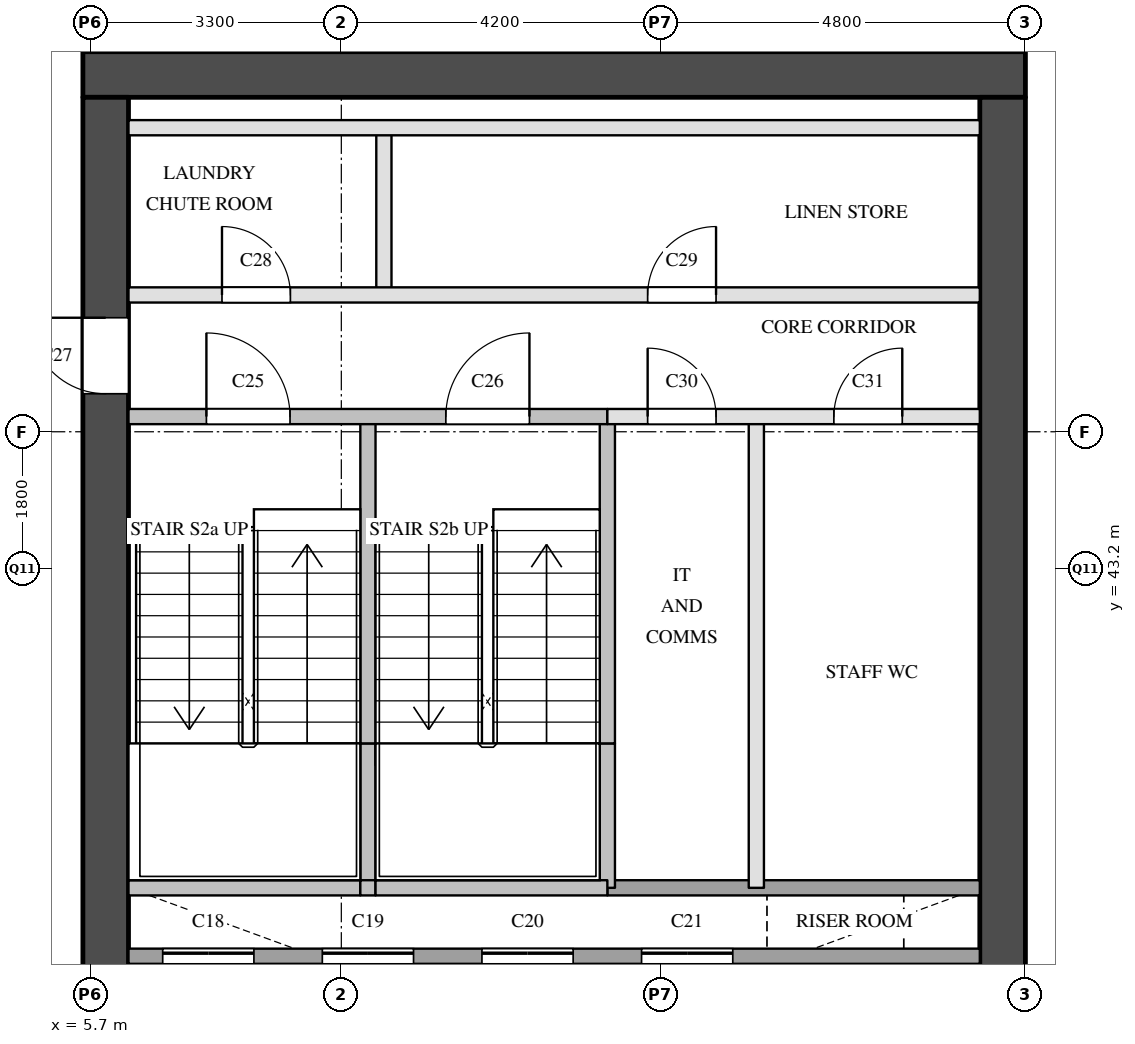
"""IFC4 building model, lengths in metres.
Left out: names, types, materials, properties, quantities, classifications, styles, units other than length and angle.
Written with IfcOpenShell. Run it as: python <this file> out.ifc"""

import sys

from ifc_helpers import new_model, si_unit, direction, frame, frame_2d, origin, place, context, subcontext, project, spatial, rectangle, extrude, element, fill, save


model = new_model("IFC4")
c1 = context("Model", 3, precision=1e-05, world=origin(), true_north=direction((0.0, 1.0)))
c2 = subcontext(c1, "Body", "Model", "MODEL_VIEW")
j1 = project(units=[si_unit("LENGTHUNIT", "METRE"), si_unit("PLANEANGLEUNIT", "RADIAN")], contexts=[c1])
p1 = place(None, origin())
s1 = spatial("IfcSite", under=j1, at=p1, CompositionType="ELEMENT")
p2 = place(p1, origin())
s2 = spatial("IfcBuilding", under=s1, at=p2, CompositionType="ELEMENT")
p3 = place(p2, frame((0.0, 0.0, 65.2)))
s3 = spatial("IfcBuildingStorey", under=s2, at=p3, CompositionType="ELEMENT", Elevation=65.2)
p4 = place(p3, frame((5.6, 49.7, 0.0), z_axis=(0.0, 0.0, 1.0), x_axis=(1.0, 0.0, 0.0)))
e1 = element("IfcWall", 1, at=p4, inside=s3, PredefinedType="SHEAR", context=c2, shape_type="SweptSolid", body=[
    extrude(rectangle(XDim=12.4, YDim=0.6, at=frame_2d((6.2, 0.0))), origin(), (0.0, 0.0, 1.0), 3.5),
])
p5 = place(p3, frame((5.9, 29.1, 0.0), z_axis=(0.0, 0.0, 1.0), x_axis=(0.0, 1.0, 0.0)))
e2 = element("IfcWall", 2, at=p5, inside=s3, PredefinedType="SHEAR", context=c2, shape_type="SweptSolid", body=[
    extrude(rectangle(XDim=20.3, YDim=0.6, at=frame_2d((10.15, 0.0))), origin(), (0.0, 0.0, 1.0), 3.5),
])
p6 = place(p5, frame((3.6, 0.0, 0.0)))
e3 = element("IfcOpeningElement", 3, at=p6, cuts=e2, PredefinedType="OPENING", context=c2, shape_type="SweptSolid", body=[
    extrude(rectangle(XDim=1.8, YDim=2.1, at=frame_2d((0.9, 1.05))), frame((0.0, 0.31, 0.0), z_axis=(0.0, -1.0, 0.0), x_axis=(1.0, 0.0, 0.0)), (0.0, 0.0, 1.0), 0.62),
])
p7 = place(p5, frame((16.4, 0.0, 0.0)))
e4 = element("IfcOpeningElement", 4, at=p7, cuts=e2, PredefinedType="OPENING", context=c2, shape_type="SweptSolid", body=[
    extrude(rectangle(XDim=1.0, YDim=2.1, at=frame_2d((0.5, 1.05))), frame((0.0, 0.31, 0.0), z_axis=(0.0, -1.0, 0.0), x_axis=(1.0, 0.0, 0.0)), (0.0, 0.0, 1.0), 0.62),
])
p8 = place(p3, frame((17.7, 29.1, 0.0), z_axis=(0.0, 0.0, 1.0), x_axis=(0.0, 1.0, 0.0)))
e5 = element("IfcWall", 5, at=p8, inside=s3, PredefinedType="SHEAR", context=c2, shape_type="SweptSolid", body=[
    extrude(rectangle(XDim=20.3, YDim=0.6, at=frame_2d((10.15, 0.0))), origin(), (0.0, 0.0, 1.0), 3.5),
])
p9 = place(p8, frame((1.25, 0.0, 0.0)))
e6 = element("IfcOpeningElement", 6, at=p9, cuts=e5, PredefinedType="OPENING", context=c2, shape_type="SweptSolid", body=[
    extrude(rectangle(XDim=0.7, YDim=2.1, at=frame_2d((0.35, 1.05))), frame((0.0, 0.31, 0.0), z_axis=(0.0, -1.0, 0.0), x_axis=(1.0, 0.0, 0.0)), (0.0, 0.0, 1.0), 0.62),
])
p10 = place(p8, frame((7.05, 0.0, 0.0)))
e7 = element("IfcOpeningElement", 7, at=p10, cuts=e5, PredefinedType="OPENING", context=c2, shape_type="SweptSolid", body=[
    extrude(rectangle(XDim=0.7, YDim=2.1, at=frame_2d((0.35, 1.05))), frame((0.0, 0.31, 0.0), z_axis=(0.0, -1.0, 0.0), x_axis=(1.0, 0.0, 0.0)), (0.0, 0.0, 1.0), 0.62),
])
p11 = place(p3, frame((8.3, 34.9, 0.0), z_axis=(0.0, 0.0, 1.0), x_axis=(0.0, 1.0, 0.0)))
e8 = element("IfcWall", 8, at=p11, inside=s3, PredefinedType="SOLIDWALL", context=c2, shape_type="SweptSolid", body=[
    extrude(rectangle(XDim=3.2, YDim=0.2, at=frame_2d((1.6, 0.0))), origin(), (0.0, 0.0, 1.0), 3.5),
])
p12 = place(p3, frame((9.35, 39.0, 0.0), z_axis=(0.0, 0.0, 1.0), x_axis=(0.0, 1.0, 0.0)))
e9 = element("IfcWall", 9, at=p12, inside=s3, PredefinedType="SOLIDWALL", context=c2, shape_type="SweptSolid", body=[
    extrude(rectangle(XDim=1.9, YDim=0.2, at=frame_2d((0.95, 0.0))), origin(), (0.0, 0.0, 1.0), 3.5),
])
p13 = place(p3, frame((9.35, 40.9, 0.0), z_axis=(0.0, 0.0, 1.0), x_axis=(0.0, 1.0, 0.0)))
e10 = element("IfcWall", 10, at=p13, inside=s3, PredefinedType="SOLIDWALL", context=c2, shape_type="SweptSolid", body=[
    extrude(rectangle(XDim=4.3, YDim=0.2, at=frame_2d((2.15, 0.0))), origin(), (0.0, 0.0, 1.0), 3.5),
])
p14 = place(p3, frame((9.56, 46.8, 0.0), z_axis=(0.0, 0.0, 1.0), x_axis=(0.0, 1.0, 0.0)))
e11 = element("IfcWall", 11, at=p14, inside=s3, PredefinedType="PARTITIONING", context=c2, shape_type="SweptSolid", body=[
    extrude(rectangle(XDim=2.2, YDim=0.2, at=frame_2d((1.1, 0.0))), origin(), (0.0, 0.0, 1.0), 3.5),
])
for number, where, z_axis, x_axis in (
    (12, (10.4, 34.9, 0.0), (0.0, 0.0, 1.0), (0.0, 1.0, 0.0)),
    (13, (12.5, 34.9, 0.0), (0.0, 0.0, 1.0), (0.0, 1.0, 0.0)),
):
    element("IfcWall", number, at=place(p3, frame(where, z_axis=z_axis, x_axis=x_axis)), inside=s3, PredefinedType="SOLIDWALL", context=c2, shape_type="SweptSolid", body=[
        extrude(rectangle(XDim=3.2, YDim=0.2, at=frame_2d((1.6, 0.0))), origin(), (0.0, 0.0, 1.0), 3.5),
    ])
p15 = place(p3, frame((12.5, 39.0, 0.0), z_axis=(0.0, 0.0, 1.0), x_axis=(0.0, 1.0, 0.0)))
e14 = element("IfcWall", 14, at=p15, inside=s3, PredefinedType="SOLIDWALL", context=c2, shape_type="SweptSolid", body=[
    extrude(rectangle(XDim=1.9, YDim=0.2, at=frame_2d((0.95, 0.0))), origin(), (0.0, 0.0, 1.0), 3.5),
])
p16 = place(p3, frame((12.5, 40.9, 0.0), z_axis=(0.0, 0.0, 1.0), x_axis=(0.0, 1.0, 0.0)))
e15 = element("IfcWall", 15, at=p16, inside=s3, PredefinedType="SOLIDWALL", context=c2, shape_type="SweptSolid", body=[
    extrude(rectangle(XDim=4.3, YDim=0.2, at=frame_2d((2.15, 0.0))), origin(), (0.0, 0.0, 1.0), 3.5),
])
p17 = place(p3, frame((14.46, 39.0, 0.0), z_axis=(0.0, 0.0, 1.0), x_axis=(0.0, 1.0, 0.0)))
e16 = element("IfcWall", 16, at=p17, inside=s3, PredefinedType="PARTITIONING", context=c2, shape_type="SweptSolid", body=[
    extrude(rectangle(XDim=6.2, YDim=0.2, at=frame_2d((3.1, 0.0))), origin(), (0.0, 0.0, 1.0), 3.5),
])
for number, where, z_axis, x_axis in (
    (17, (14.6, 34.9, 0.0), (0.0, 0.0, 1.0), (0.0, 1.0, 0.0)),
    (18, (16.7, 34.9, 0.0), (0.0, 0.0, 1.0), (0.0, 1.0, 0.0)),
):
    element("IfcWall", number, at=place(p3, frame(where, z_axis=z_axis, x_axis=x_axis)), inside=s3, PredefinedType="SOLIDWALL", context=c2, shape_type="SweptSolid", body=[
        extrude(rectangle(XDim=3.2, YDim=0.2, at=frame_2d((1.6, 0.0))), origin(), (0.0, 0.0, 1.0), 3.5),
    ])
p18 = place(p3, frame((6.2, 38.1, 0.0), z_axis=(0.0, 0.0, 1.0), x_axis=(1.0, 0.0, 0.0)))
e19 = element("IfcWall", 19, at=p18, inside=s3, PredefinedType="SOLIDWALL", context=c2, shape_type="SweptSolid", body=[
    extrude(rectangle(XDim=11.2, YDim=0.2, at=frame_2d((5.6, 0.0))), origin(), (0.0, 0.0, 1.0), 3.5),
])
p19 = place(p18, frame((0.45, 0.0, 0.0)))
e20 = element("IfcOpeningElement", 20, at=p19, cuts=e19, PredefinedType="OPENING", context=c2, shape_type="SweptSolid", body=[
    extrude(rectangle(XDim=1.2, YDim=2.1, at=frame_2d((0.6, 1.05))), frame((0.0, 0.11, 0.0), z_axis=(0.0, -1.0, 0.0), x_axis=(1.0, 0.0, 0.0)), (0.0, 0.0, 1.0), 0.22),
])
p20 = place(p18, frame((2.55, 0.0, 0.0)))
e21 = element("IfcOpeningElement", 21, at=p20, cuts=e19, PredefinedType="OPENING", context=c2, shape_type="SweptSolid", body=[
    extrude(rectangle(XDim=1.2, YDim=2.1, at=frame_2d((0.6, 1.05))), frame((0.0, 0.11, 0.0), z_axis=(0.0, -1.0, 0.0), x_axis=(1.0, 0.0, 0.0)), (0.0, 0.0, 1.0), 0.22),
])
p21 = place(p18, frame((4.65, 0.0, 0.0)))
e22 = element("IfcOpeningElement", 22, at=p21, cuts=e19, PredefinedType="OPENING", context=c2, shape_type="SweptSolid", body=[
    extrude(rectangle(XDim=1.2, YDim=2.1, at=frame_2d((0.6, 1.05))), frame((0.0, 0.11, 0.0), z_axis=(0.0, -1.0, 0.0), x_axis=(1.0, 0.0, 0.0)), (0.0, 0.0, 1.0), 0.22),
])
p22 = place(p18, frame((6.75, 0.0, 0.0)))
e23 = element("IfcOpeningElement", 23, at=p22, cuts=e19, PredefinedType="OPENING", context=c2, shape_type="SweptSolid", body=[
    extrude(rectangle(XDim=1.2, YDim=2.1, at=frame_2d((0.6, 1.05))), frame((0.0, 0.11, 0.0), z_axis=(0.0, -1.0, 0.0), x_axis=(1.0, 0.0, 0.0)), (0.0, 0.0, 1.0), 0.22),
])
p23 = place(p3, frame((12.5, 39.0, 0.0), z_axis=(0.0, 0.0, 1.0), x_axis=(1.0, 0.0, 0.0)))
e24 = element("IfcWall", 24, at=p23, inside=s3, PredefinedType="SOLIDWALL", context=c2, shape_type="SweptSolid", body=[
    extrude(rectangle(XDim=4.9, YDim=0.2, at=frame_2d((2.45, 0.0))), origin(), (0.0, 0.0, 1.0), 3.5),
])
p24 = place(p3, frame((6.2, 39.0, 0.0), z_axis=(0.0, 0.0, 1.0), x_axis=(1.0, 0.0, 0.0)))
e25 = element("IfcWall", 25, at=p24, inside=s3, PredefinedType="SOLIDWALL", context=c2, shape_type="SweptSolid", body=[
    extrude(rectangle(XDim=3.05, YDim=0.2, at=frame_2d((1.525, 0.0))), origin(), (0.0, 0.0, 1.0), 3.5),
])
p25 = place(p3, frame((9.25, 39.0, 0.0), z_axis=(0.0, 0.0, 1.0), x_axis=(1.0, 0.0, 0.0)))
e26 = element("IfcWall", 26, at=p25, inside=s3, PredefinedType="SOLIDWALL", context=c2, shape_type="SweptSolid", body=[
    extrude(rectangle(XDim=0.2, YDim=0.2, at=frame_2d((0.1, 0.0))), origin(), (0.0, 0.0, 1.0), 3.5),
])
p26 = place(p3, frame((9.45, 39.0, 0.0), z_axis=(0.0, 0.0, 1.0), x_axis=(1.0, 0.0, 0.0)))
e27 = element("IfcWall", 27, at=p26, inside=s3, PredefinedType="SOLIDWALL", context=c2, shape_type="SweptSolid", body=[
    extrude(rectangle(XDim=3.05, YDim=0.2, at=frame_2d((1.525, 0.0))), origin(), (0.0, 0.0, 1.0), 3.5),
])
p27 = place(p3, frame((12.5, 45.2, 0.0), z_axis=(0.0, 0.0, 1.0), x_axis=(1.0, 0.0, 0.0)))
e28 = element("IfcWall", 28, at=p27, inside=s3, PredefinedType="PARTITIONING", context=c2, shape_type="SweptSolid", body=[
    extrude(rectangle(XDim=4.9, YDim=0.2, at=frame_2d((2.45, 0.0))), origin(), (0.0, 0.0, 1.0), 3.5),
])
p28 = place(p27, frame((0.53, 0.0, 0.0)))
e29 = element("IfcOpeningElement", 29, at=p28, cuts=e28, PredefinedType="OPENING", context=c2, shape_type="SweptSolid", body=[
    extrude(rectangle(XDim=0.9, YDim=2.1, at=frame_2d((0.45, 1.05))), frame((0.0, 0.11, 0.0), z_axis=(0.0, -1.0, 0.0), x_axis=(1.0, 0.0, 0.0)), (0.0, 0.0, 1.0), 0.22),
])
p29 = place(p27, frame((2.98, 0.0, 0.0)))
e30 = element("IfcOpeningElement", 30, at=p29, cuts=e28, PredefinedType="OPENING", context=c2, shape_type="SweptSolid", body=[
    extrude(rectangle(XDim=0.9, YDim=2.1, at=frame_2d((0.45, 1.05))), frame((0.0, 0.11, 0.0), z_axis=(0.0, -1.0, 0.0), x_axis=(1.0, 0.0, 0.0)), (0.0, 0.0, 1.0), 0.22),
])
p30 = place(p3, frame((6.2, 45.2, 0.0), z_axis=(0.0, 0.0, 1.0), x_axis=(1.0, 0.0, 0.0)))
e31 = element("IfcWall", 31, at=p30, inside=s3, PredefinedType="SOLIDWALL", context=c2, shape_type="SweptSolid", body=[
    extrude(rectangle(XDim=6.3, YDim=0.2, at=frame_2d((3.15, 0.0))), origin(), (0.0, 0.0, 1.0), 3.5),
])
p31 = place(p30, frame((1.025, 0.0, 0.0)))
e32 = element("IfcOpeningElement", 32, at=p31, cuts=e31, PredefinedType="OPENING", context=c2, shape_type="SweptSolid", body=[
    extrude(rectangle(XDim=1.1, YDim=2.1, at=frame_2d((0.55, 1.05))), frame((0.0, 0.11, 0.0), z_axis=(0.0, -1.0, 0.0), x_axis=(1.0, 0.0, 0.0)), (0.0, 0.0, 1.0), 0.22),
])
p32 = place(p30, frame((4.175, 0.0, 0.0)))
e33 = element("IfcOpeningElement", 33, at=p32, cuts=e31, PredefinedType="OPENING", context=c2, shape_type="SweptSolid", body=[
    extrude(rectangle(XDim=1.1, YDim=2.1, at=frame_2d((0.55, 1.05))), frame((0.0, 0.11, 0.0), z_axis=(0.0, -1.0, 0.0), x_axis=(1.0, 0.0, 0.0)), (0.0, 0.0, 1.0), 0.22),
])
p33 = place(p3, frame((6.2, 46.8, 0.0), z_axis=(0.0, 0.0, 1.0), x_axis=(1.0, 0.0, 0.0)))
e34 = element("IfcWall", 34, at=p33, inside=s3, PredefinedType="PARTITIONING", context=c2, shape_type="SweptSolid", body=[
    extrude(rectangle(XDim=11.2, YDim=0.2, at=frame_2d((5.6, 0.0))), origin(), (0.0, 0.0, 1.0), 3.5),
])
p34 = place(p33, frame((1.23, 0.0, 0.0)))
e35 = element("IfcOpeningElement", 35, at=p34, cuts=e34, PredefinedType="OPENING", context=c2, shape_type="SweptSolid", body=[
    extrude(rectangle(XDim=0.9, YDim=2.1, at=frame_2d((0.45, 1.05))), frame((0.0, 0.11, 0.0), z_axis=(0.0, -1.0, 0.0), x_axis=(1.0, 0.0, 0.0)), (0.0, 0.0, 1.0), 0.22),
])
p35 = place(p33, frame((6.83, 0.0, 0.0)))
e36 = element("IfcOpeningElement", 36, at=p35, cuts=e34, PredefinedType="OPENING", context=c2, shape_type="SweptSolid", body=[
    extrude(rectangle(XDim=0.9, YDim=2.1, at=frame_2d((0.45, 1.05))), frame((0.0, 0.11, 0.0), z_axis=(0.0, -1.0, 0.0), x_axis=(1.0, 0.0, 0.0)), (0.0, 0.0, 1.0), 0.22),
])
p36 = place(p3, frame((6.2, 49.0, 0.0), z_axis=(0.0, 0.0, 1.0), x_axis=(1.0, 0.0, 0.0)))
e37 = element("IfcWall", 37, at=p36, inside=s3, PredefinedType="PARTITIONING", context=c2, shape_type="SweptSolid", body=[
    extrude(rectangle(XDim=11.2, YDim=0.2, at=frame_2d((5.6, 0.0))), origin(), (0.0, 0.0, 1.0), 3.5),
])
p37 = place(p19, origin())
e38 = element("IfcDoor", 38, at=p37, inside=s3, OperationType="SLIDING_TO_LEFT", PredefinedType="DOOR", context=c2, shape_type="SweptSolid", body=[
    extrude(rectangle(XDim=1.2, YDim=2.1, at=frame_2d((0.6, 1.05))), frame((0.0, 0.025, 0.0), z_axis=(0.0, -1.0, 0.0), x_axis=(1.0, 0.0, 0.0)), (0.0, 0.0, 1.0), 0.05),
])
fill(e20, e38)
p38 = place(p20, origin())
e39 = element("IfcDoor", 39, at=p38, inside=s3, OperationType="SLIDING_TO_LEFT", PredefinedType="DOOR", context=c2, shape_type="SweptSolid", body=[
    extrude(rectangle(XDim=1.2, YDim=2.1, at=frame_2d((0.6, 1.05))), frame((0.0, 0.025, 0.0), z_axis=(0.0, -1.0, 0.0), x_axis=(1.0, 0.0, 0.0)), (0.0, 0.0, 1.0), 0.05),
])
fill(e21, e39)
p39 = place(p21, origin())
e40 = element("IfcDoor", 40, at=p39, inside=s3, OperationType="SLIDING_TO_LEFT", PredefinedType="DOOR", context=c2, shape_type="SweptSolid", body=[
    extrude(rectangle(XDim=1.2, YDim=2.1, at=frame_2d((0.6, 1.05))), frame((0.0, 0.025, 0.0), z_axis=(0.0, -1.0, 0.0), x_axis=(1.0, 0.0, 0.0)), (0.0, 0.0, 1.0), 0.05),
])
fill(e22, e40)
p40 = place(p22, origin())
e41 = element("IfcDoor", 41, at=p40, inside=s3, OperationType="SLIDING_TO_LEFT", PredefinedType="DOOR", context=c2, shape_type="SweptSolid", body=[
    extrude(rectangle(XDim=1.2, YDim=2.1, at=frame_2d((0.6, 1.05))), frame((0.0, 0.025, 0.0), z_axis=(0.0, -1.0, 0.0), x_axis=(1.0, 0.0, 0.0)), (0.0, 0.0, 1.0), 0.05),
])
fill(e23, e41)
p41 = place(p31, origin())
e42 = element("IfcDoor", 42, at=p41, inside=s3, OperationType="SINGLE_SWING_LEFT", PredefinedType="DOOR", context=c2, shape_type="SweptSolid", body=[
    extrude(rectangle(XDim=1.1, YDim=2.1, at=frame_2d((0.55, 1.05))), frame((0.0, 0.025, 0.0), z_axis=(0.0, -1.0, 0.0), x_axis=(1.0, 0.0, 0.0)), (0.0, 0.0, 1.0), 0.05),
])
fill(e32, e42)
p42 = place(p32, origin())
e43 = element("IfcDoor", 43, at=p42, inside=s3, OperationType="SINGLE_SWING_RIGHT", PredefinedType="DOOR", context=c2, shape_type="SweptSolid", body=[
    extrude(rectangle(XDim=1.1, YDim=2.1, at=frame_2d((0.55, 1.05))), frame((0.0, 0.025, 0.0), z_axis=(0.0, -1.0, 0.0), x_axis=(1.0, 0.0, 0.0)), (0.0, 0.0, 1.0), 0.05),
])
fill(e33, e43)
p43 = place(p7, origin())
e44 = element("IfcDoor", 44, at=p43, inside=s3, OperationType="SINGLE_SWING_RIGHT", PredefinedType="DOOR", context=c2, shape_type="SweptSolid", body=[
    extrude(rectangle(XDim=1.0, YDim=2.1, at=frame_2d((0.5, 1.05))), frame((0.0, 0.025, 0.0), z_axis=(0.0, -1.0, 0.0), x_axis=(1.0, 0.0, 0.0)), (0.0, 0.0, 1.0), 0.05),
])
fill(e4, e44)
p44 = place(p34, origin())
e45 = element("IfcDoor", 45, at=p44, inside=s3, OperationType="SINGLE_SWING_LEFT", PredefinedType="DOOR", context=c2, shape_type="SweptSolid", body=[
    extrude(rectangle(XDim=0.9, YDim=2.1, at=frame_2d((0.45, 1.05))), frame((0.0, 0.025, 0.0), z_axis=(0.0, -1.0, 0.0), x_axis=(1.0, 0.0, 0.0)), (0.0, 0.0, 1.0), 0.05),
])
fill(e35, e45)
p45 = place(p35, origin())
e46 = element("IfcDoor", 46, at=p45, inside=s3, OperationType="SINGLE_SWING_RIGHT", PredefinedType="DOOR", context=c2, shape_type="SweptSolid", body=[
    extrude(rectangle(XDim=0.9, YDim=2.1, at=frame_2d((0.45, 1.05))), frame((0.0, 0.025, 0.0), z_axis=(0.0, -1.0, 0.0), x_axis=(1.0, 0.0, 0.0)), (0.0, 0.0, 1.0), 0.05),
])
fill(e36, e46)
p46 = place(p28, origin())
e47 = element("IfcDoor", 47, at=p46, inside=s3, OperationType="SINGLE_SWING_LEFT", PredefinedType="DOOR", context=c2, shape_type="SweptSolid", body=[
    extrude(rectangle(XDim=0.9, YDim=2.1, at=frame_2d((0.45, 1.05))), frame((0.0, 0.025, 0.0), z_axis=(0.0, -1.0, 0.0), x_axis=(1.0, 0.0, 0.0)), (0.0, 0.0, 1.0), 0.05),
])
fill(e29, e47)
p47 = place(p29, origin())
e48 = element("IfcDoor", 48, at=p47, inside=s3, OperationType="SINGLE_SWING_RIGHT", PredefinedType="DOOR", context=c2, shape_type="SweptSolid", body=[
    extrude(rectangle(XDim=0.9, YDim=2.1, at=frame_2d((0.45, 1.05))), frame((0.0, 0.025, 0.0), z_axis=(0.0, -1.0, 0.0), x_axis=(1.0, 0.0, 0.0)), (0.0, 0.0, 1.0), 0.05),
])
fill(e30, e48)
save(model, sys.argv[1])
